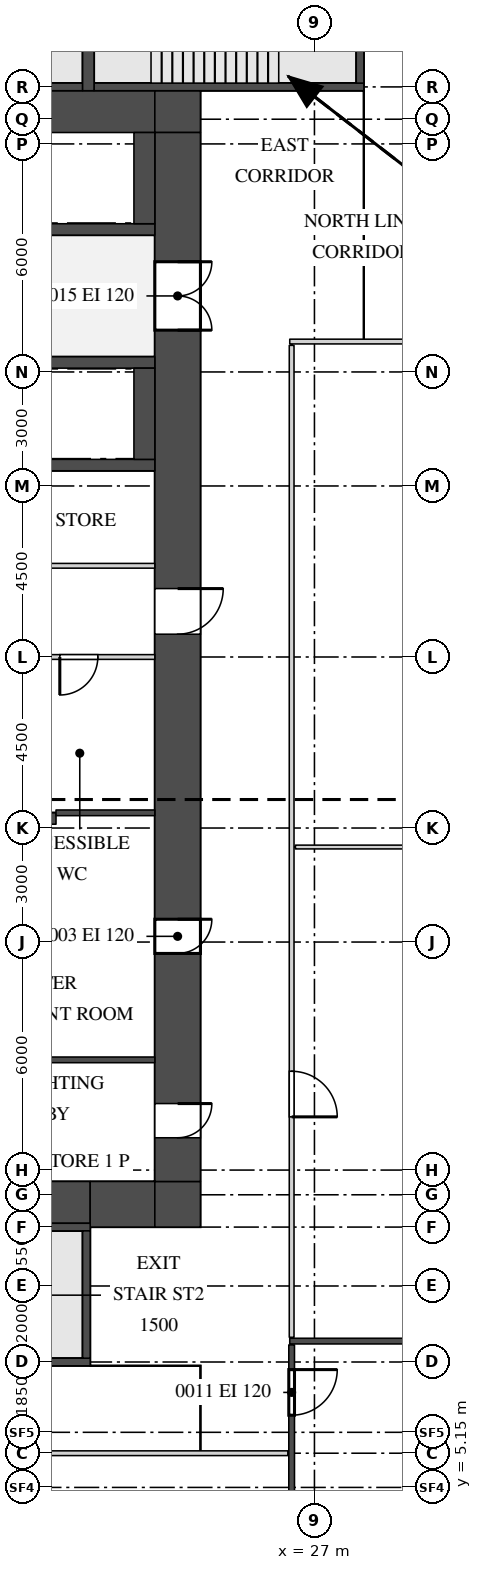
"""IFC4 building model, lengths in metres.
Left out: names, types, materials, properties, quantities, classifications, styles, units other than length and angle.
Written with IfcOpenShell. Run it as: python <this file> out.ifc"""

import sys

from ifc_helpers import new_model, si_unit, direction, frame, frame_2d, origin, place, context, subcontext, project, spatial, rectangle, extrude, source, transform, mapped, element, fill, save


model = new_model("IFC4")
c1 = context("Model", 3, precision=1e-05, world=origin(), true_north=direction((0.0, 1.0)))
c2 = subcontext(c1, "Body", "Model", "MODEL_VIEW")
j1 = project(units=[si_unit("LENGTHUNIT", "METRE"), si_unit("PLANEANGLEUNIT", "RADIAN")], contexts=[c1])
p1 = place(None, origin())
s1 = spatial("IfcSite", under=j1, at=p1, CompositionType="ELEMENT")
p2 = place(p1, origin())
s2 = spatial("IfcBuilding", under=s1, at=p2, CompositionType="ELEMENT")
p3 = place(p2, frame((0.0, 0.0, 73.5)))
s3 = spatial("IfcBuildingStorey", under=s2, at=p3, CompositionType="ELEMENT", Elevation=73.5)
m1 = source(origin(), c2, "Body", "SweptSolid", [
    extrude(rectangle(XDim=8.9, YDim=1.1, at=frame_2d((4.45, 0.0))), origin(), (0.0, 0.0, 1.0), 4.2),
])
p4 = place(p3, frame((13.9, 41.35, 0.0), z_axis=(0.0, 0.0, 1.0), x_axis=(1.0, 0.0, 0.0)))
e1 = element("IfcWall", 1, at=p4, inside=s3, PredefinedType="SHEAR", context=c2, shape_type="MappedRepresentation", body=[
    mapped(m1, transform((0.0, 0.0, 0.0))),
])
m2 = source(origin(), c2, "Body", "SweptSolid", [
    extrude(rectangle(XDim=1.2, YDim=1.1, at=frame_2d((0.6, 0.0))), origin(), (0.0, 0.0, 1.0), 4.2),
])
p5 = place(p3, frame((22.8, 41.35, 0.0), z_axis=(0.0, 0.0, 1.0), x_axis=(1.0, 0.0, 0.0)))
e2 = element("IfcWall", 2, at=p5, inside=s3, PredefinedType="SHEAR", context=c2, shape_type="MappedRepresentation", body=[
    mapped(m2, transform((0.0, 0.0, 0.0))),
])
m3 = source(origin(), c2, "Body", "SweptSolid", [
    extrude(rectangle(XDim=7.2, YDim=1.1, at=frame_2d((3.6, 0.0))), origin(), (0.0, 0.0, 1.0), 4.2),
])
p6 = place(p3, frame((13.9, 12.65, 0.0), z_axis=(0.0, 0.0, 1.0), x_axis=(1.0, 0.0, 0.0)))
e3 = element("IfcWall", 3, at=p6, inside=s3, PredefinedType="SHEAR", context=c2, shape_type="MappedRepresentation", body=[
    mapped(m3, transform((0.0, 0.0, 0.0))),
])
m4 = source(origin(), c2, "Body", "SweptSolid", [
    extrude(rectangle(XDim=1.0, YDim=2.1, at=frame_2d((0.5, 1.05))), frame((0.0, 0.56, 0.0), z_axis=(0.0, -1.0, 0.0), x_axis=(1.0, 0.0, 0.0)), (0.0, 0.0, 1.0), 1.12),
])
p7 = place(p6, frame((0.8, 0.0, 0.0)))
e4 = element("IfcOpeningElement", 4, at=p7, cuts=e3, PredefinedType="OPENING", context=c2, shape_type="MappedRepresentation", body=[
    mapped(m4, transform((0.0, 0.0, 0.0))),
])
m5 = source(origin(), c2, "Body", "SweptSolid", [
    extrude(rectangle(XDim=1.7, YDim=1.2, at=frame_2d((0.85, 0.0))), origin(), (0.0, 0.0, 1.0), 4.2),
])
p8 = place(p3, frame((21.1, 12.6, 0.0), z_axis=(0.0, 0.0, 1.0), x_axis=(1.0, 0.0, 0.0)))
e5 = element("IfcWall", 5, at=p8, inside=s3, PredefinedType="SHEAR", context=c2, shape_type="MappedRepresentation", body=[
    mapped(m5, transform((0.0, 0.0, 0.0))),
])
m6 = source(origin(), c2, "Body", "SweptSolid", [
    extrude(rectangle(XDim=1.2, YDim=1.2, at=frame_2d((0.6, 0.0))), origin(), (0.0, 0.0, 1.0), 4.2),
])
p9 = place(p3, frame((22.8, 12.6, 0.0), z_axis=(0.0, 0.0, 1.0), x_axis=(1.0, 0.0, 0.0)))
e6 = element("IfcWall", 6, at=p9, inside=s3, PredefinedType="SHEAR", context=c2, shape_type="MappedRepresentation", body=[
    mapped(m6, transform((0.0, 0.0, 0.0))),
])
m7 = source(origin(), c2, "Body", "SweptSolid", [
    extrude(rectangle(XDim=27.6, YDim=1.2, at=frame_2d((13.8, 0.0))), origin(), (0.0, 0.0, 1.0), 4.2),
])
p10 = place(p3, frame((23.4, 13.2, 0.0), z_axis=(0.0, 0.0, 1.0), x_axis=(0.0, 1.0, 0.0)))
e7 = element("IfcWall", 7, at=p10, inside=s3, PredefinedType="SHEAR", context=c2, shape_type="MappedRepresentation", body=[
    mapped(m7, transform((0.0, 0.0, 0.0))),
])
m8 = source(origin(), c2, "Body", "SweptSolid", [
    extrude(rectangle(XDim=1.8, YDim=2.1, at=frame_2d((0.9, 1.05))), frame((0.0, 0.61, 0.0), z_axis=(0.0, -1.0, 0.0), x_axis=(1.0, 0.0, 0.0)), (0.0, 0.0, 1.0), 1.22),
])
p11 = place(p10, frame((22.4, 0.0, 0.0)))
e8 = element("IfcOpeningElement", 8, at=p11, cuts=e7, PredefinedType="OPENING", context=c2, shape_type="MappedRepresentation", body=[
    mapped(m8, transform((0.0, 0.0, 0.0))),
])
m9 = source(origin(), c2, "Body", "SweptSolid", [
    extrude(rectangle(XDim=1.2, YDim=2.1, at=frame_2d((0.6, 1.05))), frame((0.0, 0.61, 0.0), z_axis=(0.0, -1.0, 0.0), x_axis=(1.0, 0.0, 0.0)), (0.0, 0.0, 1.0), 1.22),
])
p12 = place(p10, frame((14.4, 0.0, 0.0)))
e9 = element("IfcOpeningElement", 9, at=p12, cuts=e7, PredefinedType="OPENING", context=c2, shape_type="MappedRepresentation", body=[
    mapped(m9, transform((0.0, 0.0, 0.0))),
])
m10 = source(origin(), c2, "Body", "SweptSolid", [
    extrude(rectangle(XDim=0.9, YDim=2.1, at=frame_2d((0.45, 1.05))), frame((0.0, 0.61, 0.0), z_axis=(0.0, -1.0, 0.0), x_axis=(1.0, 0.0, 0.0)), (0.0, 0.0, 1.0), 1.22),
])
p13 = place(p10, frame((1.15, 0.0, 0.0)))
e10 = element("IfcOpeningElement", 10, at=p13, cuts=e7, PredefinedType="OPENING", context=c2, shape_type="MappedRepresentation", body=[
    mapped(m10, transform((0.0, 0.0, 0.0))),
])
p14 = place(p10, frame((6.0, 0.0, 0.0)))
e11 = element("IfcOpeningElement", 11, at=p14, cuts=e7, PredefinedType="OPENING", context=c2, shape_type="MappedRepresentation", body=[
    mapped(m10, transform((0.0, 0.0, 0.0))),
])
m11 = source(origin(), c2, "Body", "SweptSolid", [
    extrude(rectangle(XDim=7.0, YDim=0.2, at=frame_2d((3.5, 0.0))), origin(), (0.0, 0.0, 1.0), 4.2),
])
p15 = place(p3, frame((13.9, 42.0, 0.0), z_axis=(0.0, 0.0, 1.0), x_axis=(1.0, 0.0, 0.0)))
e12 = element("IfcWall", 12, at=p15, inside=s3, PredefinedType="SHEAR", context=c2, shape_type="MappedRepresentation", body=[
    mapped(m11, transform((0.0, 0.0, 0.0))),
])
m12 = source(origin(), c2, "Body", "SweptSolid", [
    extrude(rectangle(XDim=5.3, YDim=0.2, at=frame_2d((2.65, 0.0))), origin(), (0.0, 0.0, 1.0), 4.2),
])
p16 = place(p3, frame((15.8, 12.0, 0.0), z_axis=(0.0, 0.0, 1.0), x_axis=(1.0, 0.0, 0.0)))
e13 = element("IfcWall", 13, at=p16, inside=s3, PredefinedType="SHEAR", context=c2, shape_type="MappedRepresentation", body=[
    mapped(m12, transform((0.0, 0.0, 0.0))),
])
m13 = source(origin(), c2, "Body", "SweptSolid", [
    extrude(rectangle(XDim=7.2, YDim=0.2, at=frame_2d((3.6, 0.0))), origin(), (0.0, 0.0, 1.0), 4.2),
])
p17 = place(p3, frame((13.9, 8.45, 0.0), z_axis=(0.0, 0.0, 1.0), x_axis=(1.0, 0.0, 0.0)))
e14 = element("IfcWall", 14, at=p17, inside=s3, PredefinedType="SHEAR", context=c2, shape_type="MappedRepresentation", body=[
    mapped(m13, transform((0.0, 0.0, 0.0))),
])
m14 = source(origin(), c2, "Body", "SweptSolid", [
    extrude(rectangle(XDim=1.2, YDim=2.1, at=frame_2d((0.6, 1.05))), frame((0.0, 0.11, 0.0), z_axis=(0.0, -1.0, 0.0), x_axis=(1.0, 0.0, 0.0)), (0.0, 0.0, 1.0), 0.22),
])
p18 = place(p17, frame((0.35, 0.0, 0.0)))
e15 = element("IfcOpeningElement", 15, at=p18, cuts=e14, PredefinedType="OPENING", context=c2, shape_type="MappedRepresentation", body=[
    mapped(m14, transform((0.0, 0.0, 0.0))),
])
m15 = source(origin(), c2, "Body", "SweptSolid", [
    extrude(rectangle(XDim=7.1, YDim=0.2, at=frame_2d((3.55, 0.0))), origin(), (0.0, 0.0, 1.0), 4.2),
])
p19 = place(p3, frame((21.2, 42.0, 0.0), z_axis=(0.0, 0.0, 1.0), x_axis=(1.0, 0.0, 0.0)))
e16 = element("IfcWall", 16, at=p19, inside=s3, PredefinedType="SHEAR", context=c2, shape_type="MappedRepresentation", body=[
    mapped(m15, transform((0.0, 0.0, 0.0))),
])
m16 = source(origin(), c2, "Body", "SweptSolid", [
    extrude(rectangle(XDim=3.75, YDim=0.3, at=frame_2d((1.875, 0.0))), origin(), (0.0, 0.0, 1.0), 4.2),
])
p20 = place(p3, frame((21.05, 41.9, 0.0), z_axis=(0.0, 0.0, 1.0), x_axis=(0.0, 1.0, 0.0)))
e17 = element("IfcWall", 17, at=p20, inside=s3, PredefinedType="SHEAR", context=c2, shape_type="MappedRepresentation", body=[
    mapped(m16, transform((0.0, 0.0, 0.0))),
])
m17 = source(origin(), c2, "Body", "SweptSolid", [
    extrude(rectangle(XDim=3.35, YDim=0.2, at=frame_2d((1.675, 0.0))), origin(), (0.0, 0.0, 1.0), 4.2),
])
for number, where, z_axis, x_axis in (
    (18, (21.0, 8.55, 0.0), (0.0, 0.0, 1.0), (0.0, 1.0, 0.0)),
    (19, (28.2, 42.1, 0.0), (0.0, 0.0, 1.0), (0.0, 1.0, 0.0)),
):
    element("IfcWall", number, at=place(p3, frame(where, z_axis=z_axis, x_axis=x_axis)), inside=s3, PredefinedType="SHEAR", context=c2, shape_type="MappedRepresentation", body=[
        mapped(m17, transform((0.0, 0.0, 0.0))),
    ])
m18 = source(origin(), c2, "Body", "SweptSolid", [
    extrude(rectangle(XDim=13.0, YDim=0.3, at=frame_2d((6.5, 0.0))), origin(), (0.0, 0.0, 1.0), 4.2),
])
p21 = place(p3, frame((7.2, 22.75, 0.0), z_axis=(0.0, 0.0, 1.0), x_axis=(1.0, 0.0, 0.0)))
e20 = element("IfcWall", 20, at=p21, inside=s3, PredefinedType="STANDARD", context=c2, shape_type="MappedRepresentation", body=[
    mapped(m18, transform((0.0, 0.0, 0.0))),
])
m19 = source(origin(), c2, "Body", "SweptSolid", [
    extrude(rectangle(XDim=15.6, YDim=0.3, at=frame_2d((7.8, 0.0))), origin(), (0.0, 0.0, 1.0), 4.2),
])
p22 = place(p3, frame((7.2, 32.05, 0.0), z_axis=(0.0, 0.0, 1.0), x_axis=(1.0, 0.0, 0.0)))
e21 = element("IfcWall", 21, at=p22, inside=s3, PredefinedType="STANDARD", context=c2, shape_type="MappedRepresentation", body=[
    mapped(m19, transform((0.0, 0.0, 0.0))),
])
p23 = place(p3, frame((7.2, 38.25, 0.0), z_axis=(0.0, 0.0, 1.0), x_axis=(1.0, 0.0, 0.0)))
e22 = element("IfcWall", 22, at=p23, inside=s3, PredefinedType="STANDARD", context=c2, shape_type="MappedRepresentation", body=[
    mapped(m19, transform((0.0, 0.0, 0.0))),
])
m20 = source(origin(), c2, "Body", "SweptSolid", [
    extrude(rectangle(XDim=1.2, YDim=2.1, at=frame_2d((0.6, 1.05))), frame((0.0, 0.16, 0.0), z_axis=(0.0, -1.0, 0.0), x_axis=(1.0, 0.0, 0.0)), (0.0, 0.0, 1.0), 0.32),
])
p24 = place(p23, frame((0.55, 0.0, 0.0)))
e23 = element("IfcOpeningElement", 23, at=p24, cuts=e22, PredefinedType="OPENING", context=c2, shape_type="MappedRepresentation", body=[
    mapped(m20, transform((0.0, 0.0, 0.0))),
])
p25 = place(p23, frame((3.1, 0.0, 0.0)))
e24 = element("IfcOpeningElement", 24, at=p25, cuts=e22, PredefinedType="OPENING", context=c2, shape_type="MappedRepresentation", body=[
    mapped(m20, transform((0.0, 0.0, 0.0))),
])
p26 = place(p23, frame((5.65, 0.0, 0.0)))
e25 = element("IfcOpeningElement", 25, at=p26, cuts=e22, PredefinedType="OPENING", context=c2, shape_type="MappedRepresentation", body=[
    mapped(m20, transform((0.0, 0.0, 0.0))),
])
p27 = place(p23, frame((8.2, 0.0, 0.0)))
e26 = element("IfcOpeningElement", 26, at=p27, cuts=e22, PredefinedType="OPENING", context=c2, shape_type="MappedRepresentation", body=[
    mapped(m20, transform((0.0, 0.0, 0.0))),
])
p28 = place(p3, frame((7.2, 34.75, 0.0), z_axis=(0.0, 0.0, 1.0), x_axis=(1.0, 0.0, 0.0)))
e27 = element("IfcWall", 27, at=p28, inside=s3, PredefinedType="STANDARD", context=c2, shape_type="MappedRepresentation", body=[
    mapped(m19, transform((0.0, 0.0, 0.0))),
])
p29 = place(p28, frame((0.55, 0.0, 0.0)))
e28 = element("IfcOpeningElement", 28, at=p29, cuts=e27, PredefinedType="OPENING", context=c2, shape_type="MappedRepresentation", body=[
    mapped(m20, transform((0.0, 0.0, 0.0))),
])
p30 = place(p28, frame((3.1, 0.0, 0.0)))
e29 = element("IfcOpeningElement", 29, at=p30, cuts=e27, PredefinedType="OPENING", context=c2, shape_type="MappedRepresentation", body=[
    mapped(m20, transform((0.0, 0.0, 0.0))),
])
p31 = place(p28, frame((5.65, 0.0, 0.0)))
e30 = element("IfcOpeningElement", 30, at=p31, cuts=e27, PredefinedType="OPENING", context=c2, shape_type="MappedRepresentation", body=[
    mapped(m20, transform((0.0, 0.0, 0.0))),
])
p32 = place(p28, frame((8.2, 0.0, 0.0)))
e31 = element("IfcOpeningElement", 31, at=p32, cuts=e27, PredefinedType="OPENING", context=c2, shape_type="MappedRepresentation", body=[
    mapped(m20, transform((0.0, 0.0, 0.0))),
])
m21 = source(origin(), c2, "Body", "SweptSolid", [
    extrude(rectangle(XDim=2.4, YDim=0.55, at=frame_2d((1.2, 0.0))), origin(), (0.0, 0.0, 1.0), 4.2),
])
for number, where, z_axis, x_axis in (
    (32, (22.525, 38.4, 0.0), (0.0, 0.0, 1.0), (0.0, 1.0, 0.0)),
    (33, (22.525, 32.2, 0.0), (0.0, 0.0, 1.0), (0.0, 1.0, 0.0)),
):
    element("IfcWall", number, at=place(p3, frame(where, z_axis=z_axis, x_axis=x_axis)), inside=s3, PredefinedType="STANDARD", context=c2, shape_type="MappedRepresentation", body=[
        mapped(m21, transform((0.0, 0.0, 0.0))),
    ])
m22 = source(origin(), c2, "Body", "SweptSolid", [
    extrude(rectangle(XDim=8.75, YDim=0.15, at=frame_2d((4.375, 0.0))), origin(), (0.0, 0.0, 1.0), 4.3),
])
p33 = place(p3, frame((26.4, 0.15, 0.0), z_axis=(0.0, 0.0, 1.0), x_axis=(0.0, 1.0, 0.0)))
e34 = element("IfcWall", 34, at=p33, inside=s3, PredefinedType="PARTITIONING", context=c2, shape_type="MappedRepresentation", body=[
    mapped(m22, transform((0.0, 0.0, 0.0))),
])
m23 = source(origin(), c2, "Body", "SweptSolid", [
    extrude(rectangle(XDim=1.2, YDim=2.1, at=frame_2d((0.6, 1.05))), frame((0.0, 0.085, 0.0), z_axis=(0.0, -1.0, 0.0), x_axis=(1.0, 0.0, 0.0)), (0.0, 0.0, 1.0), 0.17),
])
p34 = place(p33, frame((6.9, 0.0, 0.0)))
e35 = element("IfcOpeningElement", 35, at=p34, cuts=e34, PredefinedType="OPENING", context=c2, shape_type="MappedRepresentation", body=[
    mapped(m23, transform((0.0, 0.0, 0.0))),
])
m24 = source(origin(), c2, "Body", "SweptSolid", [
    extrude(rectangle(XDim=22.15, YDim=0.125, at=frame_2d((11.075, 0.0))), origin(), (0.0, 0.0, 1.0), 4.3),
])
p35 = place(p3, frame((4.15, 6.05, 0.0), z_axis=(0.0, 0.0, 1.0), x_axis=(1.0, 0.0, 0.0)))
e36 = element("IfcWall", 36, at=p35, inside=s3, PredefinedType="PARTITIONING", context=c2, shape_type="MappedRepresentation", body=[
    mapped(m24, transform((0.0, 0.0, 0.0))),
])
m25 = source(origin(), c2, "Body", "SweptSolid", [
    extrude(rectangle(XDim=1.2, YDim=2.1, at=frame_2d((0.6, 1.05))), frame((0.0, 0.073, 0.0), z_axis=(0.0, -1.0, 0.0), x_axis=(1.0, 0.0, 0.0)), (0.0, 0.0, 1.0), 0.145),
])
p36 = place(p35, frame((9.2, 0.0, 0.0)))
e37 = element("IfcOpeningElement", 37, at=p36, cuts=e36, PredefinedType="OPENING", context=c2, shape_type="MappedRepresentation", body=[
    mapped(m25, transform((0.0, 0.0, 0.0))),
])
m26 = source(origin(), c2, "Body", "SweptSolid", [
    extrude(rectangle(XDim=27.5, YDim=0.15, at=frame_2d((13.75, 0.0))), origin(), (0.0, 0.0, 1.0), 4.3),
])
p37 = place(p3, frame((26.35, 9.0, 0.0), z_axis=(0.0, 0.0, 1.0), x_axis=(1.0, 0.0, 0.0)))
e38 = element("IfcWall", 38, at=p37, inside=s3, PredefinedType="PARTITIONING", context=c2, shape_type="MappedRepresentation", body=[
    mapped(m26, transform((0.0, 0.0, 0.0))),
])
m27 = source(origin(), c2, "Body", "SweptSolid", [
    extrude(rectangle(XDim=26.1, YDim=0.125, at=frame_2d((13.05, 0.0))), origin(), (0.0, 0.0, 1.0), 4.3),
])
p38 = place(p3, frame((26.4, 9.1, 0.0), z_axis=(0.0, 0.0, 1.0), x_axis=(0.0, 1.0, 0.0)))
e39 = element("IfcWall", 39, at=p38, inside=s3, PredefinedType="PARTITIONING", context=c2, shape_type="MappedRepresentation", body=[
    mapped(m27, transform((0.0, 0.0, 0.0))),
])
p39 = place(p38, frame((5.8, 0.0, 0.0)))
e40 = element("IfcOpeningElement", 40, at=p39, cuts=e39, PredefinedType="OPENING", context=c2, shape_type="MappedRepresentation", body=[
    mapped(m25, transform((0.0, 0.0, 0.0))),
])
m28 = source(origin(), c2, "Body", "SweptSolid", [
    extrude(rectangle(XDim=6.6, YDim=0.15, at=frame_2d((3.3, 0.0))), origin(), (0.0, 0.0, 1.0), 4.3),
])
p40 = place(p3, frame((16.2, 16.4, 0.0), z_axis=(0.0, 0.0, 1.0), x_axis=(1.0, 0.0, 0.0)))
e41 = element("IfcWall", 41, at=p40, inside=s3, PredefinedType="PARTITIONING", context=c2, shape_type="MappedRepresentation", body=[
    mapped(m28, transform((0.0, 0.0, 0.0))),
])
m29 = source(origin(), c2, "Body", "SweptSolid", [
    extrude(rectangle(XDim=24.25, YDim=0.1, at=frame_2d((12.125, 0.0))), origin(), (0.0, 0.0, 1.0), 4.3),
])
p41 = place(p3, frame((26.5, 22.0, 0.0), z_axis=(0.0, 0.0, 1.0), x_axis=(1.0, 0.0, 0.0)))
e42 = element("IfcWall", 42, at=p41, inside=s3, PredefinedType="PARTITIONING", context=c2, shape_type="MappedRepresentation", body=[
    mapped(m29, transform((0.0, 0.0, 0.0))),
])
m30 = source(origin(), c2, "Body", "SweptSolid", [
    extrude(rectangle(XDim=2.6, YDim=0.15, at=frame_2d((1.3, 0.0))), origin(), (0.0, 0.0, 1.0), 4.3),
])
p42 = place(p3, frame((20.2, 22.9, 0.0), z_axis=(0.0, 0.0, 1.0), x_axis=(1.0, 0.0, 0.0)))
e43 = element("IfcWall", 43, at=p42, inside=s3, PredefinedType="PARTITIONING", context=c2, shape_type="MappedRepresentation", body=[
    mapped(m30, transform((0.0, 0.0, 0.0))),
])
m31 = source(origin(), c2, "Body", "SweptSolid", [
    extrude(rectangle(XDim=15.6, YDim=0.125, at=frame_2d((7.8, 0.0))), origin(), (0.0, 0.0, 1.0), 4.3),
])
p43 = place(p3, frame((7.2, 27.0, 0.0), z_axis=(0.0, 0.0, 1.0), x_axis=(1.0, 0.0, 0.0)))
e44 = element("IfcWall", 44, at=p43, inside=s3, PredefinedType="PARTITIONING", context=c2, shape_type="MappedRepresentation", body=[
    mapped(m31, transform((0.0, 0.0, 0.0))),
])
m32 = source(origin(), c2, "Body", "SweptSolid", [
    extrude(rectangle(XDim=0.9, YDim=2.1, at=frame_2d((0.45, 1.05))), frame((0.0, 0.073, 0.0), z_axis=(0.0, -1.0, 0.0), x_axis=(1.0, 0.0, 0.0)), (0.0, 0.0, 1.0), 0.145),
])
p44 = place(p43, frame((2.45, 0.0, 0.0)))
e45 = element("IfcOpeningElement", 45, at=p44, cuts=e44, PredefinedType="OPENING", context=c2, shape_type="MappedRepresentation", body=[
    mapped(m32, transform((0.0, 0.0, 0.0))),
])
p45 = place(p43, frame((8.25, 0.0, 0.0)))
e46 = element("IfcOpeningElement", 46, at=p45, cuts=e44, PredefinedType="OPENING", context=c2, shape_type="MappedRepresentation", body=[
    mapped(m32, transform((0.0, 0.0, 0.0))),
])
m33 = source(origin(), c2, "Body", "SweptSolid", [
    extrude(rectangle(XDim=1.0, YDim=2.1, at=frame_2d((0.5, 1.05))), frame((0.0, 0.073, 0.0), z_axis=(0.0, -1.0, 0.0), x_axis=(1.0, 0.0, 0.0)), (0.0, 0.0, 1.0), 0.145),
])
p46 = place(p43, frame((13.1, 0.0, 0.0)))
e47 = element("IfcOpeningElement", 47, at=p46, cuts=e44, PredefinedType="OPENING", context=c2, shape_type="MappedRepresentation", body=[
    mapped(m33, transform((0.0, 0.0, 0.0))),
])
m34 = source(origin(), c2, "Body", "SweptSolid", [
    extrude(rectangle(XDim=7.65, YDim=0.125, at=frame_2d((3.825, 0.0))), origin(), (0.0, 0.0, 1.0), 4.3),
])
p47 = place(p3, frame((15.15, 29.4, 0.0), z_axis=(0.0, 0.0, 1.0), x_axis=(1.0, 0.0, 0.0)))
e48 = element("IfcWall", 48, at=p47, inside=s3, PredefinedType="PARTITIONING", context=c2, shape_type="MappedRepresentation", body=[
    mapped(m34, transform((0.0, 0.0, 0.0))),
])
p48 = place(p47, frame((3.4, 0.0, 0.0)))
e49 = element("IfcOpeningElement", 49, at=p48, cuts=e48, PredefinedType="OPENING", context=c2, shape_type="MappedRepresentation", body=[
    mapped(m32, transform((0.0, 0.0, 0.0))),
])
m35 = source(origin(), c2, "Body", "SweptSolid", [
    extrude(rectangle(XDim=27.5, YDim=0.125, at=frame_2d((13.75, 0.0))), origin(), (0.0, 0.0, 1.0), 4.3),
])
p49 = place(p3, frame((26.35, 35.3, 0.0), z_axis=(0.0, 0.0, 1.0), x_axis=(1.0, 0.0, 0.0)))
e50 = element("IfcWall", 50, at=p49, inside=s3, PredefinedType="PARTITIONING", context=c2, shape_type="MappedRepresentation", body=[
    mapped(m35, transform((0.0, 0.0, 0.0))),
])
p50 = place(p49, frame((14.2, 0.0, 0.0)))
e51 = element("IfcOpeningElement", 51, at=p50, cuts=e50, PredefinedType="OPENING", context=c2, shape_type="MappedRepresentation", body=[
    mapped(m25, transform((0.0, 0.0, 0.0))),
])
m36 = source(origin(), c2, "Body", "SweptSolid", [
    extrude(rectangle(XDim=1.8, YDim=2.1, at=frame_2d((0.9, 1.05))), frame((0.0, 0.55, 0.0), z_axis=(0.0, -1.0, 0.0), x_axis=(1.0, 0.0, 0.0)), (0.0, 0.0, 1.0), 1.1),
])
p51 = place(p11, origin())
e52 = element("IfcDoor", 52, at=p51, inside=s3, OperationType="DOUBLE_DOOR_SINGLE_SWING", PredefinedType="DOOR", context=c2, shape_type="MappedRepresentation", body=[
    mapped(m36, transform((0.0, 0.0, 0.0))),
])
fill(e8, e52)
m37 = source(origin(), c2, "Body", "SweptSolid", [
    extrude(rectangle(XDim=1.2, YDim=2.1, at=frame_2d((0.6, 1.05))), frame((0.0, 0.55, 0.0), z_axis=(0.0, -1.0, 0.0), x_axis=(1.0, 0.0, 0.0)), (0.0, 0.0, 1.0), 1.1),
])
p52 = place(p12, origin())
e53 = element("IfcDoor", 53, at=p52, inside=s3, OperationType="SINGLE_SWING_RIGHT", PredefinedType="DOOR", context=c2, shape_type="MappedRepresentation", body=[
    mapped(m37, transform((0.0, 0.0, 0.0))),
])
fill(e9, e53)
m38 = source(origin(), c2, "Body", "SweptSolid", [
    extrude(rectangle(XDim=1.0, YDim=2.1, at=frame_2d((0.5, 1.05))), frame((0.0, 0.025, 0.0), z_axis=(0.0, -1.0, 0.0), x_axis=(1.0, 0.0, 0.0)), (0.0, 0.0, 1.0), 0.05),
])
p53 = place(p46, origin())
e54 = element("IfcDoor", 54, at=p53, inside=s3, OperationType="SINGLE_SWING_LEFT", PredefinedType="DOOR", context=c2, shape_type="MappedRepresentation", body=[
    mapped(m38, transform((0.0, 0.0, 0.0))),
])
fill(e47, e54)
m39 = source(origin(), c2, "Body", "SweptSolid", [
    extrude(rectangle(XDim=0.9, YDim=2.1, at=frame_2d((0.45, 1.05))), frame((0.0, 0.55, 0.0), z_axis=(0.0, -1.0, 0.0), x_axis=(1.0, 0.0, 0.0)), (0.0, 0.0, 1.0), 1.1),
])
p54 = place(p13, origin())
e55 = element("IfcDoor", 55, at=p54, inside=s3, OperationType="SINGLE_SWING_RIGHT", PredefinedType="DOOR", context=c2, shape_type="MappedRepresentation", body=[
    mapped(m39, transform((0.0, 0.0, 0.0))),
])
fill(e10, e55)
p55 = place(p14, origin())
e56 = element("IfcDoor", 56, at=p55, inside=s3, OperationType="SINGLE_SWING_RIGHT", PredefinedType="DOOR", context=c2, shape_type="MappedRepresentation", body=[
    mapped(m39, transform((0.0, 0.0, 0.0))),
])
fill(e11, e56)
m40 = source(origin(), c2, "Body", "SweptSolid", [
    extrude(rectangle(XDim=1.2, YDim=2.1, at=frame_2d((0.6, 1.05))), frame((0.0, 0.025, 0.0), z_axis=(0.0, -1.0, 0.0), x_axis=(1.0, 0.0, 0.0)), (0.0, 0.0, 1.0), 0.05),
])
p56 = place(p34, origin())
e57 = element("IfcDoor", 57, at=p56, inside=s3, OperationType="SINGLE_SWING_RIGHT", PredefinedType="DOOR", context=c2, shape_type="MappedRepresentation", body=[
    mapped(m40, transform((0.0, 0.0, 0.0))),
])
fill(e35, e57)
p57 = place(p39, origin())
e58 = element("IfcDoor", 58, at=p57, inside=s3, OperationType="SINGLE_SWING_LEFT", PredefinedType="DOOR", context=c2, shape_type="MappedRepresentation", body=[
    mapped(m40, transform((0.0, 0.0, 0.0))),
])
fill(e40, e58)
save(model, sys.argv[1])
